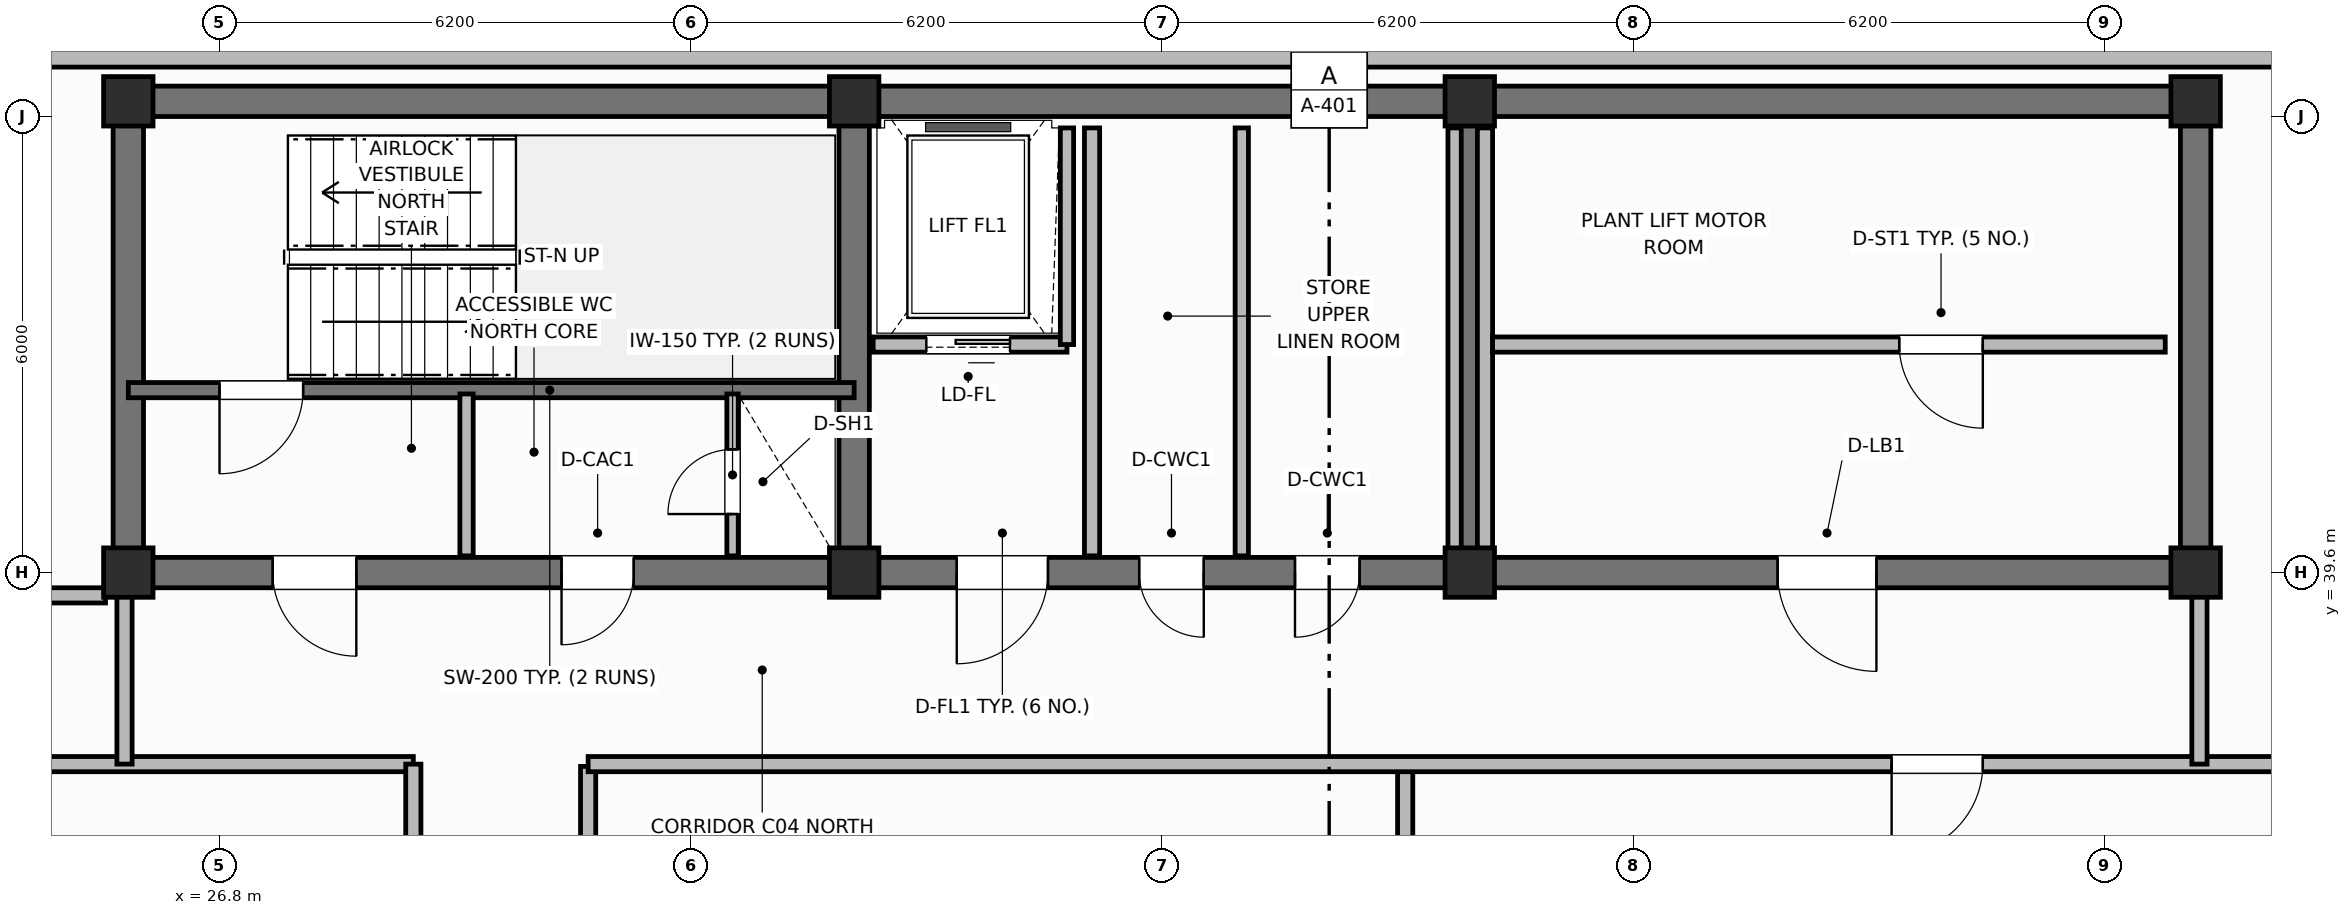
"""IFC4 building model, lengths in metres.
Left out: names, types, materials, properties, quantities, classifications, styles, units other than length and angle.
Written with IfcOpenShell. Run it as: python <this file> out.ifc"""

import sys

from ifc_helpers import new_model, si_unit, direction, frame, frame_2d, origin, origin_2d, place, context, subcontext, project, spatial, rectangle, extrude, element, fill, save


model = new_model("IFC4")
c1 = context("Model", 3, precision=1e-05, world=origin(), true_north=direction((0.0, 1.0)))
c2 = subcontext(c1, "Body", "Model", "MODEL_VIEW")
j1 = project(units=[si_unit("LENGTHUNIT", "METRE"), si_unit("PLANEANGLEUNIT", "RADIAN")], contexts=[c1])
p1 = place(None, origin())
s1 = spatial("IfcSite", under=j1, at=p1, CompositionType="ELEMENT")
p2 = place(p1, origin())
s2 = spatial("IfcBuilding", under=s1, at=p2, CompositionType="ELEMENT")
p3 = place(p2, frame((0.0, 0.0, 312.8)))
s3 = spatial("IfcBuildingStorey", under=s2, at=p3, CompositionType="ELEMENT", Elevation=312.8)
p4 = place(p3, frame((25.6, 45.8, 0.0), z_axis=(0.0, 0.0, 1.0), x_axis=(1.0, 0.0, 0.0)))
e1 = element("IfcWall", 1, at=p4, inside=s3, PredefinedType="SHEAR", context=c2, shape_type="SweptSolid", body=[
    extrude(rectangle(XDim=27.2, YDim=0.4, at=frame_2d((13.6, 0.0))), origin(), (0.0, 0.0, 1.0), 3.6),
])
for number, where, z_axis, x_axis in (
    (2, (25.6, 39.8, 0.0), (0.0, 0.0, 1.0), (0.0, 1.0, 0.0)),
    (3, (52.8, 39.8, 0.0), (0.0, 0.0, 1.0), (0.0, 1.0, 0.0)),
):
    element("IfcWall", number, at=place(p3, frame(where, z_axis=z_axis, x_axis=x_axis)), inside=s3, PredefinedType="SHEAR", context=c2, shape_type="SweptSolid", body=[
        extrude(rectangle(XDim=5.8, YDim=0.4, at=frame_2d((2.9, 0.0))), origin(), (0.0, 0.0, 1.0), 3.6),
    ])
p5 = place(p3, frame((52.8, 39.6, 0.0), z_axis=(0.0, 0.0, 1.0), x_axis=(-1.0, 0.0, 0.0)))
e4 = element("IfcWall", 4, at=p5, inside=s3, PredefinedType="SHEAR", context=c2, shape_type="SweptSolid", body=[
    extrude(rectangle(XDim=27.2, YDim=0.4, at=frame_2d((13.6, 0.0))), origin(), (0.0, 0.0, 1.0), 3.6),
])
p6 = place(p5, frame((24.2, 0.0, 0.0)))
e5 = element("IfcOpeningElement", 5, at=p6, cuts=e4, PredefinedType="OPENING", context=c2, shape_type="SweptSolid", body=[
    extrude(rectangle(XDim=1.1, YDim=2.15, at=frame_2d((0.55, 1.075))), frame((0.0, 0.21, 0.0), z_axis=(0.0, -1.0, 0.0), x_axis=(1.0, 0.0, 0.0)), (0.0, 0.0, 1.0), 0.42),
])
p7 = place(p5, frame((20.55, 0.0, 0.0)))
e6 = element("IfcOpeningElement", 6, at=p7, cuts=e4, PredefinedType="OPENING", context=c2, shape_type="SweptSolid", body=[
    extrude(rectangle(XDim=0.95, YDim=2.1, at=frame_2d((0.475, 1.05))), frame((0.0, 0.21, 0.0), z_axis=(0.0, -1.0, 0.0), x_axis=(1.0, 0.0, 0.0)), (0.0, 0.0, 1.0), 0.42),
])
p8 = place(p5, frame((15.1, 0.0, 0.0)))
e7 = element("IfcOpeningElement", 7, at=p8, cuts=e4, PredefinedType="OPENING", context=c2, shape_type="SweptSolid", body=[
    extrude(rectangle(XDim=1.2, YDim=2.15, at=frame_2d((0.6, 1.075))), frame((0.0, 0.21, 0.0), z_axis=(0.0, -1.0, 0.0), x_axis=(1.0, 0.0, 0.0)), (0.0, 0.0, 1.0), 0.42),
])
p9 = place(p5, frame((13.05, 0.0, 0.0)))
e8 = element("IfcOpeningElement", 8, at=p9, cuts=e4, PredefinedType="OPENING", context=c2, shape_type="SweptSolid", body=[
    extrude(rectangle(XDim=0.85, YDim=2.1, at=frame_2d((0.425, 1.05))), frame((0.0, 0.21, 0.0), z_axis=(0.0, -1.0, 0.0), x_axis=(1.0, 0.0, 0.0)), (0.0, 0.0, 1.0), 0.42),
])
p10 = place(p5, frame((11.0, 0.0, 0.0)))
e9 = element("IfcOpeningElement", 9, at=p10, cuts=e4, PredefinedType="OPENING", context=c2, shape_type="SweptSolid", body=[
    extrude(rectangle(XDim=0.85, YDim=2.1, at=frame_2d((0.425, 1.05))), frame((0.0, 0.21, 0.0), z_axis=(0.0, -1.0, 0.0), x_axis=(1.0, 0.0, 0.0)), (0.0, 0.0, 1.0), 0.42),
])
p11 = place(p5, frame((4.2, 0.0, 0.0)))
e10 = element("IfcOpeningElement", 10, at=p11, cuts=e4, PredefinedType="OPENING", context=c2, shape_type="SweptSolid", body=[
    extrude(rectangle(XDim=1.3, YDim=2.2, at=frame_2d((0.65, 1.1))), frame((0.0, 0.21, 0.0), z_axis=(0.0, -1.0, 0.0), x_axis=(1.0, 0.0, 0.0)), (0.0, 0.0, 1.0), 0.42),
])
for number, where, z_axis, x_axis in (
    (11, (35.15, 39.8, 0.0), (0.0, 0.0, 1.0), (0.0, 1.0, 0.0)),
    (12, (43.25, 39.8, 0.0), (0.0, 0.0, 1.0), (0.0, 1.0, 0.0)),
):
    element("IfcWall", number, at=place(p3, frame(where, z_axis=z_axis, x_axis=x_axis)), inside=s3, PredefinedType="SHEAR", context=c2, shape_type="SweptSolid", body=[
        extrude(rectangle(XDim=5.8, YDim=0.4, at=frame_2d((2.9, 0.0))), origin(), (0.0, 0.0, 1.0), 3.6),
    ])
for number, where, z_axis, x_axis in (
    (13, (25.6, 39.6, 0.0), (0.0, 0.0, 1.0), (1.0, 0.0, 0.0)),
    (14, (25.6, 45.8, 0.0), (0.0, 0.0, 1.0), (1.0, 0.0, 0.0)),
    (15, (35.15, 39.6, 0.0), (0.0, 0.0, 1.0), (1.0, 0.0, 0.0)),
    (16, (35.15, 45.8, 0.0), (0.0, 0.0, 1.0), (1.0, 0.0, 0.0)),
    (17, (43.25, 39.6, 0.0), (0.0, 0.0, 1.0), (1.0, 0.0, 0.0)),
    (18, (43.25, 45.8, 0.0), (0.0, 0.0, 1.0), (1.0, 0.0, 0.0)),
    (19, (52.8, 39.6, 0.0), (0.0, 0.0, 1.0), (1.0, 0.0, 0.0)),
    (20, (52.8, 45.8, 0.0), (0.0, 0.0, 1.0), (1.0, 0.0, 0.0)),
):
    element("IfcColumn", number, at=place(p3, frame(where, z_axis=z_axis, x_axis=x_axis)), inside=s3, PredefinedType="COLUMN", context=c2, shape_type="SweptSolid", body=[
        extrude(rectangle(XDim=0.65, YDim=0.65, at=origin_2d()), origin(), (0.0, 0.0, 1.0), 3.6),
    ])
p12 = place(p3, frame((54.64, 46.4, 0.0), z_axis=(0.0, 0.0, 1.0), x_axis=(-1.0, 0.0, 0.0)))
e21 = element("IfcWall", 21, at=p12, inside=s3, PredefinedType="SOLIDWALL", context=c2, shape_type="SweptSolid", body=[
    extrude(rectangle(XDim=30.88, YDim=0.3, at=frame_2d((15.44, 0.0))), origin(), (0.0, 0.0, 1.0), 2.84),
])
p13 = place(p3, frame((35.15, 42.0, 0.0), z_axis=(0.0, 0.0, 1.0), x_axis=(-1.0, 0.0, 0.0)))
e22 = element("IfcWall", 22, at=p13, inside=s3, PredefinedType="SHEAR", context=c2, shape_type="SweptSolid", body=[
    extrude(rectangle(XDim=9.55, YDim=0.2, at=frame_2d((4.775, 0.0))), origin(), (0.0, 0.0, 1.0), 3.6),
])
p14 = place(p13, frame((7.25, 0.0, 0.0)))
e23 = element("IfcOpeningElement", 23, at=p14, cuts=e22, PredefinedType="OPENING", context=c2, shape_type="SweptSolid", body=[
    extrude(rectangle(XDim=1.1, YDim=2.15, at=frame_2d((0.55, 1.075))), frame((0.0, 0.11, 0.0), z_axis=(0.0, -1.0, 0.0), x_axis=(1.0, 0.0, 0.0)), (0.0, 0.0, 1.0), 0.22),
])
p15 = place(p3, frame((33.55, 39.82, 0.0), z_axis=(0.0, 0.0, 1.0), x_axis=(0.0, 1.0, 0.0)))
e24 = element("IfcWall", 24, at=p15, inside=s3, PredefinedType="PARTITIONING", context=c2, shape_type="SweptSolid", body=[
    extrude(rectangle(XDim=2.13, YDim=0.15, at=frame_2d((1.065, 0.0))), origin(), (0.0, 0.0, 1.0), 2.54),
])
p16 = place(p15, frame((0.55, 0.0, 0.0)))
e25 = element("IfcOpeningElement", 25, at=p16, cuts=e24, PredefinedType="OPENING", context=c2, shape_type="SweptSolid", body=[
    extrude(rectangle(XDim=0.85, YDim=2.05, at=frame_2d((0.425, 1.025))), frame((0.0, 0.085, 0.0), z_axis=(0.0, -1.0, 0.0), x_axis=(1.0, 0.0, 0.0)), (0.0, 0.0, 1.0), 0.17),
])
p17 = place(p3, frame((30.05, 39.82, 0.0), z_axis=(0.0, 0.0, 1.0), x_axis=(0.0, 1.0, 0.0)))
e26 = element("IfcWall", 26, at=p17, inside=s3, PredefinedType="PARTITIONING", context=c2, shape_type="SweptSolid", body=[
    extrude(rectangle(XDim=2.13, YDim=0.175, at=frame_2d((1.065, 0.0))), origin(), (0.0, 0.0, 1.0), 2.54),
])
p18 = place(p3, frame((37.95, 42.6, 0.0), z_axis=(0.0, 0.0, 1.0), x_axis=(-1.0, 0.0, 0.0)))
e27 = element("IfcWall", 27, at=p18, inside=s3, PredefinedType="PARTITIONING", context=c2, shape_type="SweptSolid", body=[
    extrude(rectangle(XDim=2.55, YDim=0.2, at=frame_2d((1.275, 0.0))), origin(), (0.0, 0.0, 1.0), 2.2),
])
p19 = place(p18, frame((0.75, 0.0, 0.0)))
e28 = element("IfcOpeningElement", 28, at=p19, cuts=e27, PredefinedType="OPENING", context=c2, shape_type="SweptSolid", body=[
    extrude(rectangle(XDim=1.1, YDim=2.15, at=frame_2d((0.55, 1.075))), frame((0.0, 0.11, 0.0), z_axis=(0.0, -1.0, 0.0), x_axis=(1.0, 0.0, 0.0)), (0.0, 0.0, 1.0), 0.22),
])
p20 = place(p3, frame((37.95, 42.6, 0.0), z_axis=(0.0, 0.0, 1.0), x_axis=(0.0, 1.0, 0.0)))
e29 = element("IfcWall", 29, at=p20, inside=s3, PredefinedType="PARTITIONING", context=c2, shape_type="SweptSolid", body=[
    extrude(rectangle(XDim=2.85, YDim=0.175, at=frame_2d((1.425, 0.0))), origin(), (0.0, 0.0, 1.0), 2.54),
])
p21 = place(p3, frame((38.28, 39.82, 0.0), z_axis=(0.0, 0.0, 1.0), x_axis=(0.0, 1.0, 0.0)))
e30 = element("IfcWall", 30, at=p21, inside=s3, PredefinedType="PARTITIONING", context=c2, shape_type="SweptSolid", body=[
    extrude(rectangle(XDim=5.63, YDim=0.2, at=frame_2d((2.815, 0.0))), origin(), (0.0, 0.0, 1.0), 2.54),
])
for number, where, z_axis, x_axis in (
    (31, (43.05, 39.82, 0.0), (0.0, 0.0, 1.0), (0.0, 1.0, 0.0)),
    (32, (40.25, 39.82, 0.0), (0.0, 0.0, 1.0), (0.0, 1.0, 0.0)),
):
    element("IfcWall", number, at=place(p3, frame(where, z_axis=z_axis, x_axis=x_axis)), inside=s3, PredefinedType="PARTITIONING", context=c2, shape_type="SweptSolid", body=[
        extrude(rectangle(XDim=5.63, YDim=0.175, at=frame_2d((2.815, 0.0))), origin(), (0.0, 0.0, 1.0), 2.54),
    ])
p22 = place(p3, frame((43.45, 39.82, 0.0), z_axis=(0.0, 0.0, 1.0), x_axis=(0.0, 1.0, 0.0)))
e33 = element("IfcWall", 33, at=p22, inside=s3, PredefinedType="PARTITIONING", context=c2, shape_type="SweptSolid", body=[
    extrude(rectangle(XDim=5.63, YDim=0.2, at=frame_2d((2.815, 0.0))), origin(), (0.0, 0.0, 1.0), 2.54),
])
p23 = place(p3, frame((52.4, 42.6, 0.0), z_axis=(0.0, 0.0, 1.0), x_axis=(-1.0, 0.0, 0.0)))
e34 = element("IfcWall", 34, at=p23, inside=s3, PredefinedType="PARTITIONING", context=c2, shape_type="SweptSolid", body=[
    extrude(rectangle(XDim=8.85, YDim=0.2, at=frame_2d((4.425, 0.0))), origin(), (0.0, 0.0, 1.0), 2.54),
])
p24 = place(p23, frame((2.4, 0.0, 0.0)))
e35 = element("IfcOpeningElement", 35, at=p24, cuts=e34, PredefinedType="OPENING", context=c2, shape_type="SweptSolid", body=[
    extrude(rectangle(XDim=1.1, YDim=2.15, at=frame_2d((0.55, 1.075))), frame((0.0, 0.11, 0.0), z_axis=(0.0, -1.0, 0.0), x_axis=(1.0, 0.0, 0.0)), (0.0, 0.0, 1.0), 0.22),
])
p25 = place(p3, frame((21.53, 37.08, 0.0), z_axis=(0.0, 0.0, 1.0), x_axis=(1.0, 0.0, 0.0)))
e36 = element("IfcWall", 36, at=p25, inside=s3, PredefinedType="PARTITIONING", context=c2, shape_type="SweptSolid", body=[
    extrude(rectangle(XDim=7.82, YDim=0.2, at=frame_2d((3.91, 0.0))), origin(), (0.0, 0.0, 1.0), 2.54),
])
p26 = place(p3, frame((29.35, 19.32, 0.0), z_axis=(0.0, 0.0, 1.0), x_axis=(0.0, 1.0, 0.0)))
e37 = element("IfcWall", 37, at=p26, inside=s3, PredefinedType="PARTITIONING", context=c2, shape_type="SweptSolid", body=[
    extrude(rectangle(XDim=17.76, YDim=0.2, at=frame_2d((8.88, 0.0))), origin(), (0.0, 0.0, 1.0), 2.54),
])
p27 = place(p26, frame((6.0, 0.0, 0.0)))
e38 = element("IfcOpeningElement", 38, at=p27, cuts=e37, PredefinedType="OPENING", context=c2, shape_type="SweptSolid", body=[
    extrude(rectangle(XDim=1.2, YDim=2.15, at=frame_2d((0.6, 1.075))), frame((0.0, 0.11, 0.0), z_axis=(0.0, -1.0, 0.0), x_axis=(1.0, 0.0, 0.0)), (0.0, 0.0, 1.0), 0.22),
])
p28 = place(p3, frame((31.65, 19.35, 0.0), z_axis=(0.0, 0.0, 1.0), x_axis=(0.0, 1.0, 0.0)))
e39 = element("IfcWall", 39, at=p28, inside=s3, PredefinedType="PARTITIONING", context=c2, shape_type="SweptSolid", body=[
    extrude(rectangle(XDim=17.7, YDim=0.2, at=frame_2d((8.85, 0.0))), origin(), (0.0, 0.0, 1.0), 2.54),
])
p29 = place(p28, frame((6.0, 0.0, 0.0)))
e40 = element("IfcOpeningElement", 40, at=p29, cuts=e39, PredefinedType="OPENING", context=c2, shape_type="SweptSolid", body=[
    extrude(rectangle(XDim=1.2, YDim=2.15, at=frame_2d((0.6, 1.075))), frame((0.0, 0.11, 0.0), z_axis=(0.0, -1.0, 0.0), x_axis=(1.0, 0.0, 0.0)), (0.0, 0.0, 1.0), 0.22),
])
p30 = place(p3, frame((42.4, 19.35, 0.0), z_axis=(0.0, 0.0, 1.0), x_axis=(0.0, 1.0, 0.0)))
e41 = element("IfcWall", 41, at=p30, inside=s3, PredefinedType="PARTITIONING", context=c2, shape_type="SweptSolid", body=[
    extrude(rectangle(XDim=17.7, YDim=0.2, at=frame_2d((8.85, 0.0))), origin(), (0.0, 0.0, 1.0), 2.54),
])
p31 = place(p3, frame((56.87, 37.08, 0.0), z_axis=(0.0, 0.0, 1.0), x_axis=(-1.0, 0.0, 0.0)))
e42 = element("IfcWall", 42, at=p31, inside=s3, PredefinedType="PARTITIONING", context=c2, shape_type="SweptSolid", body=[
    extrude(rectangle(XDim=25.22, YDim=0.2, at=frame_2d((12.61, 0.0))), origin(), (0.0, 0.0, 1.0), 2.54),
])
p32 = place(p31, frame((6.87, 0.0, 0.0)))
e43 = element("IfcOpeningElement", 43, at=p32, cuts=e42, PredefinedType="OPENING", context=c2, shape_type="SweptSolid", body=[
    extrude(rectangle(XDim=1.2, YDim=2.15, at=frame_2d((0.6, 1.075))), frame((0.0, 0.11, 0.0), z_axis=(0.0, -1.0, 0.0), x_axis=(1.0, 0.0, 0.0)), (0.0, 0.0, 1.0), 0.22),
])
for number, where, z_axis, x_axis in (
    (44, (52.85, 37.08, 0.0), (0.0, 0.0, 1.0), (0.0, 1.0, 0.0)),
    (45, (25.55, 37.08, 0.0), (0.0, 0.0, 1.0), (0.0, 1.0, 0.0)),
):
    element("IfcWall", number, at=place(p3, frame(where, z_axis=z_axis, x_axis=x_axis)), inside=s3, PredefinedType="PARTITIONING", context=c2, shape_type="SweptSolid", body=[
        extrude(rectangle(XDim=2.37, YDim=0.2, at=frame_2d((1.185, 0.0))), origin(), (0.0, 0.0, 1.0), 2.54),
    ])
p33 = place(p3, frame((21.53, 39.3, 0.0), z_axis=(0.0, 0.0, 1.0), x_axis=(1.0, 0.0, 0.0)))
e46 = element("IfcWall", 46, at=p33, inside=s3, PredefinedType="PARTITIONING", context=c2, shape_type="SweptSolid", body=[
    extrude(rectangle(XDim=3.77, YDim=0.2, at=frame_2d((1.885, 0.0))), origin(), (0.0, 0.0, 1.0), 2.54),
])
p34 = place(p14, origin())
e47 = element("IfcDoor", 47, at=p34, inside=s3, OperationType="SINGLE_SWING_RIGHT", PredefinedType="DOOR", context=c2, shape_type="SweptSolid", body=[
    extrude(rectangle(XDim=1.1, YDim=2.15, at=frame_2d((0.55, 1.075))), frame((0.0, 0.025, 0.0), z_axis=(0.0, -1.0, 0.0), x_axis=(1.0, 0.0, 0.0)), (0.0, 0.0, 1.0), 0.05),
])
fill(e23, e47)
p35 = place(p16, origin())
e48 = element("IfcDoor", 48, at=p35, inside=s3, OperationType="SINGLE_SWING_LEFT", PredefinedType="TRAPDOOR", context=c2, shape_type="SweptSolid", body=[
    extrude(rectangle(XDim=0.85, YDim=2.05, at=frame_2d((0.425, 1.025))), frame((0.0, 0.025, 0.0), z_axis=(0.0, -1.0, 0.0), x_axis=(1.0, 0.0, 0.0)), (0.0, 0.0, 1.0), 0.05),
])
fill(e25, e48)
p36 = place(p19, origin())
e49 = element("IfcDoor", 49, at=p36, inside=s3, OperationType="SLIDING_TO_LEFT", PredefinedType="DOOR", context=c2, shape_type="SweptSolid", body=[
    extrude(rectangle(XDim=1.1, YDim=2.15, at=frame_2d((0.55, 1.075))), frame((0.0, 0.025, 0.0), z_axis=(0.0, -1.0, 0.0), x_axis=(1.0, 0.0, 0.0)), (0.0, 0.0, 1.0), 0.05),
])
fill(e28, e49)
p37 = place(p24, origin())
e50 = element("IfcDoor", 50, at=p37, inside=s3, OperationType="SINGLE_SWING_LEFT", PredefinedType="DOOR", context=c2, shape_type="SweptSolid", body=[
    extrude(rectangle(XDim=1.1, YDim=2.15, at=frame_2d((0.55, 1.075))), frame((0.0, 0.025, 0.0), z_axis=(0.0, -1.0, 0.0), x_axis=(1.0, 0.0, 0.0)), (0.0, 0.0, 1.0), 0.05),
])
fill(e35, e50)
p38 = place(p32, origin())
e51 = element("IfcDoor", 51, at=p38, inside=s3, OperationType="SINGLE_SWING_RIGHT", PredefinedType="DOOR", context=c2, shape_type="SweptSolid", body=[
    extrude(rectangle(XDim=1.2, YDim=2.15, at=frame_2d((0.6, 1.075))), frame((0.0, 0.025, 0.0), z_axis=(0.0, -1.0, 0.0), x_axis=(1.0, 0.0, 0.0)), (0.0, 0.0, 1.0), 0.05),
])
fill(e43, e51)
p39 = place(p6, origin())
e52 = element("IfcDoor", 52, at=p39, inside=s3, OperationType="SINGLE_SWING_LEFT", PredefinedType="DOOR", context=c2, shape_type="SweptSolid", body=[
    extrude(rectangle(XDim=1.1, YDim=2.15, at=frame_2d((0.55, 1.075))), frame((0.0, 0.025, 0.0), z_axis=(0.0, -1.0, 0.0), x_axis=(1.0, 0.0, 0.0)), (0.0, 0.0, 1.0), 0.05),
])
fill(e5, e52)
p40 = place(p7, origin())
e53 = element("IfcDoor", 53, at=p40, inside=s3, OperationType="SINGLE_SWING_RIGHT", PredefinedType="DOOR", context=c2, shape_type="SweptSolid", body=[
    extrude(rectangle(XDim=0.95, YDim=2.1, at=frame_2d((0.475, 1.05))), frame((0.0, 0.025, 0.0), z_axis=(0.0, -1.0, 0.0), x_axis=(1.0, 0.0, 0.0)), (0.0, 0.0, 1.0), 0.05),
])
fill(e6, e53)
p41 = place(p8, origin())
e54 = element("IfcDoor", 54, at=p41, inside=s3, OperationType="SINGLE_SWING_RIGHT", PredefinedType="DOOR", context=c2, shape_type="SweptSolid", body=[
    extrude(rectangle(XDim=1.2, YDim=2.15, at=frame_2d((0.6, 1.075))), frame((0.0, 0.025, 0.0), z_axis=(0.0, -1.0, 0.0), x_axis=(1.0, 0.0, 0.0)), (0.0, 0.0, 1.0), 0.05),
])
fill(e7, e54)
p42 = place(p9, origin())
e55 = element("IfcDoor", 55, at=p42, inside=s3, OperationType="SINGLE_SWING_LEFT", PredefinedType="DOOR", context=c2, shape_type="SweptSolid", body=[
    extrude(rectangle(XDim=0.85, YDim=2.1, at=frame_2d((0.425, 1.05))), frame((0.0, 0.025, 0.0), z_axis=(0.0, -1.0, 0.0), x_axis=(1.0, 0.0, 0.0)), (0.0, 0.0, 1.0), 0.05),
])
fill(e8, e55)
p43 = place(p10, origin())
e56 = element("IfcDoor", 56, at=p43, inside=s3, OperationType="SINGLE_SWING_RIGHT", PredefinedType="DOOR", context=c2, shape_type="SweptSolid", body=[
    extrude(rectangle(XDim=0.85, YDim=2.1, at=frame_2d((0.425, 1.05))), frame((0.0, 0.025, 0.0), z_axis=(0.0, -1.0, 0.0), x_axis=(1.0, 0.0, 0.0)), (0.0, 0.0, 1.0), 0.05),
])
fill(e9, e56)
p44 = place(p11, origin())
e57 = element("IfcDoor", 57, at=p44, inside=s3, OperationType="SINGLE_SWING_LEFT", PredefinedType="DOOR", context=c2, shape_type="SweptSolid", body=[
    extrude(rectangle(XDim=1.3, YDim=2.2, at=frame_2d((0.65, 1.1))), frame((0.0, 0.025, 0.0), z_axis=(0.0, -1.0, 0.0), x_axis=(1.0, 0.0, 0.0)), (0.0, 0.0, 1.0), 0.05),
])
fill(e10, e57)
save(model, sys.argv[1])
